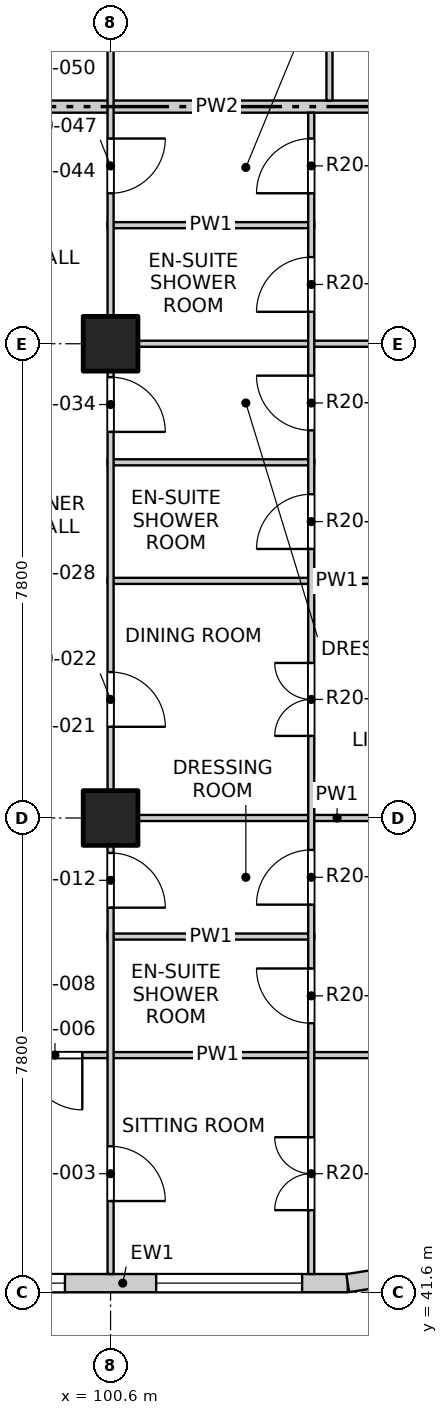
"""IFC4 building model, lengths in metres.
Left out: names, types, materials, properties, quantities, classifications, styles, units other than length and angle.
Written with IfcOpenShell. Run it as: python <this file> out.ifc"""

import sys

from ifc_helpers import new_model, si_unit, direction, frame, frame_2d, origin, origin_2d, place, context, subcontext, project, spatial, rectangle, extrude, element, fill, save


model = new_model("IFC4")
c1 = context("Model", 3, precision=1e-05, world=origin(), true_north=direction((0.0, 1.0)))
c2 = subcontext(c1, "Body", "Model", "MODEL_VIEW")
j1 = project(units=[si_unit("LENGTHUNIT", "METRE"), si_unit("PLANEANGLEUNIT", "RADIAN")], contexts=[c1])
p1 = place(None, origin())
s1 = spatial("IfcSite", under=j1, at=p1, CompositionType="ELEMENT")
p2 = place(p1, origin())
s2 = spatial("IfcBuilding", under=s1, at=p2, CompositionType="ELEMENT")
p3 = place(p2, frame((0.0, 0.0, 204.1)))
s3 = spatial("IfcBuildingStorey", under=s2, at=p3, CompositionType="ELEMENT", Elevation=204.1)
for number, where, z_axis, x_axis in (
    (1, (100.6, 49.4, -0.25), (0.0, 0.0, 1.0), (1.0, 0.0, 0.0)),
    (2, (100.6, 57.2, -0.25), (0.0, 0.0, 1.0), (1.0, 0.0, 0.0)),
):
    element("IfcColumn", number, at=place(p3, frame(where, z_axis=z_axis, x_axis=x_axis)), inside=s3, PredefinedType="COLUMN", context=c2, shape_type="SweptSolid", body=[
        extrude(rectangle(XDim=0.9, YDim=0.9, at=origin_2d()), origin(), (0.0, 0.0, 1.0), 3.4),
    ])
p4 = place(p3, frame((97.1, 41.75, 0.0), z_axis=(0.0, 0.0, 1.0), x_axis=(1.0, 0.0, 0.0)))
e3 = element("IfcWall", 3, at=p4, inside=s3, PredefinedType="SOLIDWALL", context=c2, shape_type="SweptSolid", body=[
    extrude(rectangle(XDim=7.4, YDim=0.3, at=frame_2d((3.7, 0.0))), origin(), (0.0, 0.0, 1.0), 2.7),
])
p5 = place(p4, frame((0.35, 0.0, 0.9)))
e4 = element("IfcOpeningElement", 4, at=p5, cuts=e3, PredefinedType="OPENING", context=c2, shape_type="SweptSolid", body=[
    extrude(rectangle(XDim=2.4, YDim=1.8, at=frame_2d((1.2, 0.9))), frame((0.0, 0.16, 0.0), z_axis=(0.0, -1.0, 0.0), x_axis=(1.0, 0.0, 0.0)), (0.0, 0.0, 1.0), 0.32),
])
p6 = place(p4, frame((4.25, 0.0, 0.9)))
e5 = element("IfcOpeningElement", 5, at=p6, cuts=e3, PredefinedType="OPENING", context=c2, shape_type="SweptSolid", body=[
    extrude(rectangle(XDim=2.4, YDim=1.8, at=frame_2d((1.2, 0.9))), frame((0.0, 0.16, 0.0), z_axis=(0.0, -1.0, 0.0), x_axis=(1.0, 0.0, 0.0)), (0.0, 0.0, 1.0), 0.32),
])
p7 = place(p3, frame((104.5, 41.75, 0.0), z_axis=(0.0, 0.0, 1.0), x_axis=(0.987678452879, 0.156496880861, 0.0)))
e6 = element("IfcWall", 6, at=p7, inside=s3, PredefinedType="SOLIDWALL", context=c2, shape_type="SweptSolid", body=[
    extrude(rectangle(XDim=1.173, YDim=0.3, at=frame_2d((0.586, 0.0))), origin(), (0.0, 0.0, 1.0), 2.7),
])
p8 = place(p3, frame((96.625, 45.5, 0.0), z_axis=(0.0, 0.0, 1.0), x_axis=(1.0, 0.0, 0.0)))
e7 = element("IfcWall", 7, at=p8, inside=s3, PredefinedType="PARTITIONING", context=c2, shape_type="SweptSolid", body=[
    extrude(rectangle(XDim=11.475, YDim=0.1, at=frame_2d((5.738, 0.0))), origin(), (0.0, 0.0, 1.0), 3.15),
])
p9 = place(p8, frame((2.61, 0.0, 0.0)))
e8 = element("IfcOpeningElement", 8, at=p9, cuts=e7, PredefinedType="OPENING", context=c2, shape_type="SweptSolid", body=[
    extrude(rectangle(XDim=0.9, YDim=2.1, at=frame_2d((0.45, 1.05))), frame((0.0, 0.06, 0.0), z_axis=(0.0, -1.0, 0.0), x_axis=(1.0, 0.0, 0.0)), (0.0, 0.0, 1.0), 0.12),
])
p10 = place(p3, frame((100.55, 47.45, 0.0), z_axis=(0.0, 0.0, 1.0), x_axis=(1.0, 0.0, 0.0)))
e9 = element("IfcWall", 9, at=p10, inside=s3, PredefinedType="PARTITIONING", context=c2, shape_type="SweptSolid", body=[
    extrude(rectangle(XDim=3.4, YDim=0.1, at=frame_2d((1.7, 0.0))), origin(), (0.0, 0.0, 1.0), 3.15),
])
for number, where, z_axis, x_axis in (
    (10, (100.55, 49.4, 0.0), (0.0, 0.0, 1.0), (1.0, 0.0, 0.0)),
    (11, (100.55, 53.3, 0.0), (0.0, 0.0, 1.0), (1.0, 0.0, 0.0)),
):
    element("IfcWall", number, at=place(p3, frame(where, z_axis=z_axis, x_axis=x_axis)), inside=s3, PredefinedType="PARTITIONING", context=c2, shape_type="SweptSolid", body=[
        extrude(rectangle(XDim=7.55, YDim=0.1, at=frame_2d((3.775, 0.0))), origin(), (0.0, 0.0, 1.0), 3.15),
    ])
p11 = place(p3, frame((100.55, 55.25, 0.0), z_axis=(0.0, 0.0, 1.0), x_axis=(1.0, 0.0, 0.0)))
e12 = element("IfcWall", 12, at=p11, inside=s3, PredefinedType="PARTITIONING", context=c2, shape_type="SweptSolid", body=[
    extrude(rectangle(XDim=3.4, YDim=0.1, at=frame_2d((1.7, 0.0))), origin(), (0.0, 0.0, 1.0), 3.15),
])
p12 = place(p3, frame((100.55, 57.2, 0.0), z_axis=(0.0, 0.0, 1.0), x_axis=(1.0, 0.0, 0.0)))
e13 = element("IfcWall", 13, at=p12, inside=s3, PredefinedType="PARTITIONING", context=c2, shape_type="SweptSolid", body=[
    extrude(rectangle(XDim=7.55, YDim=0.1, at=frame_2d((3.775, 0.0))), origin(), (0.0, 0.0, 1.0), 3.15),
])
p13 = place(p3, frame((100.55, 59.15, 0.0), z_axis=(0.0, 0.0, 1.0), x_axis=(1.0, 0.0, 0.0)))
e14 = element("IfcWall", 14, at=p13, inside=s3, PredefinedType="PARTITIONING", context=c2, shape_type="SweptSolid", body=[
    extrude(rectangle(XDim=3.4, YDim=0.1, at=frame_2d((1.7, 0.0))), origin(), (0.0, 0.0, 1.0), 3.15),
])
p14 = place(p3, frame((96.6, 61.1, 0.0), z_axis=(0.0, 0.0, 1.0), x_axis=(1.0, 0.0, 0.0)))
e15 = element("IfcWall", 15, at=p14, inside=s3, PredefinedType="PARTITIONING", context=c2, shape_type="SweptSolid", body=[
    extrude(rectangle(XDim=11.5, YDim=0.2, at=frame_2d((5.75, 0.0))), origin(), (0.0, 0.0, 1.0), 2.55),
])
p15 = place(p3, frame((100.6, 41.9, 0.0), z_axis=(0.0, 0.0, 1.0), x_axis=(0.0, 1.0, 0.0)))
e16 = element("IfcWall", 16, at=p15, inside=s3, PredefinedType="PARTITIONING", context=c2, shape_type="SweptSolid", body=[
    extrude(rectangle(XDim=46.2, YDim=0.1, at=frame_2d((23.1, 0.0))), origin(), (0.0, 0.0, 1.0), 3.15),
])
p16 = place(p15, frame((1.2, 0.0, 0.0)))
e17 = element("IfcOpeningElement", 17, at=p16, cuts=e16, PredefinedType="OPENING", context=c2, shape_type="SweptSolid", body=[
    extrude(rectangle(XDim=0.9, YDim=2.1, at=frame_2d((0.45, 1.05))), frame((0.0, 0.06, 0.0), z_axis=(0.0, -1.0, 0.0), x_axis=(1.0, 0.0, 0.0)), (0.0, 0.0, 1.0), 0.12),
])
p17 = place(p15, frame((6.025, 0.0, 0.0)))
e18 = element("IfcOpeningElement", 18, at=p17, cuts=e16, PredefinedType="OPENING", context=c2, shape_type="SweptSolid", body=[
    extrude(rectangle(XDim=0.9, YDim=2.1, at=frame_2d((0.45, 1.05))), frame((0.0, 0.06, 0.0), z_axis=(0.0, -1.0, 0.0), x_axis=(1.0, 0.0, 0.0)), (0.0, 0.0, 1.0), 0.12),
])
p18 = place(p15, frame((9.0, 0.0, 0.0)))
e19 = element("IfcOpeningElement", 19, at=p18, cuts=e16, PredefinedType="OPENING", context=c2, shape_type="SweptSolid", body=[
    extrude(rectangle(XDim=0.9, YDim=2.1, at=frame_2d((0.45, 1.05))), frame((0.0, 0.06, 0.0), z_axis=(0.0, -1.0, 0.0), x_axis=(1.0, 0.0, 0.0)), (0.0, 0.0, 1.0), 0.12),
])
p19 = place(p15, frame((13.85, 0.0, 0.0)))
e20 = element("IfcOpeningElement", 20, at=p19, cuts=e16, PredefinedType="OPENING", context=c2, shape_type="SweptSolid", body=[
    extrude(rectangle(XDim=0.9, YDim=2.1, at=frame_2d((0.45, 1.05))), frame((0.0, 0.06, 0.0), z_axis=(0.0, -1.0, 0.0), x_axis=(1.0, 0.0, 0.0)), (0.0, 0.0, 1.0), 0.12),
])
p20 = place(p15, frame((17.775, 0.0, 0.0)))
e21 = element("IfcOpeningElement", 21, at=p20, cuts=e16, PredefinedType="OPENING", context=c2, shape_type="SweptSolid", body=[
    extrude(rectangle(XDim=0.9, YDim=2.1, at=frame_2d((0.45, 1.05))), frame((0.0, 0.06, 0.0), z_axis=(0.0, -1.0, 0.0), x_axis=(1.0, 0.0, 0.0)), (0.0, 0.0, 1.0), 0.12),
])
p21 = place(p15, frame((20.7, 0.0, 0.0)))
e22 = element("IfcOpeningElement", 22, at=p21, cuts=e16, PredefinedType="OPENING", context=c2, shape_type="SweptSolid", body=[
    extrude(rectangle(XDim=0.9, YDim=2.1, at=frame_2d((0.45, 1.05))), frame((0.0, 0.06, 0.0), z_axis=(0.0, -1.0, 0.0), x_axis=(1.0, 0.0, 0.0)), (0.0, 0.0, 1.0), 0.12),
])
p22 = place(p15, frame((24.6, 0.0, 0.0)))
e23 = element("IfcOpeningElement", 23, at=p22, cuts=e16, PredefinedType="OPENING", context=c2, shape_type="SweptSolid", body=[
    extrude(rectangle(XDim=0.9, YDim=2.1, at=frame_2d((0.45, 1.05))), frame((0.0, 0.06, 0.0), z_axis=(0.0, -1.0, 0.0), x_axis=(1.0, 0.0, 0.0)), (0.0, 0.0, 1.0), 0.12),
])
p23 = place(p15, frame((29.425, 0.0, 0.0)))
e24 = element("IfcOpeningElement", 24, at=p23, cuts=e16, PredefinedType="OPENING", context=c2, shape_type="SweptSolid", body=[
    extrude(rectangle(XDim=0.9, YDim=2.1, at=frame_2d((0.45, 1.05))), frame((0.0, 0.06, 0.0), z_axis=(0.0, -1.0, 0.0), x_axis=(1.0, 0.0, 0.0)), (0.0, 0.0, 1.0), 0.12),
])
p24 = place(p15, frame((33.375, 0.0, 0.0)))
e25 = element("IfcOpeningElement", 25, at=p24, cuts=e16, PredefinedType="OPENING", context=c2, shape_type="SweptSolid", body=[
    extrude(rectangle(XDim=0.9, YDim=2.1, at=frame_2d((0.45, 1.05))), frame((0.0, 0.06, 0.0), z_axis=(0.0, -1.0, 0.0), x_axis=(1.0, 0.0, 0.0)), (0.0, 0.0, 1.0), 0.12),
])
p25 = place(p15, frame((36.3, 0.0, 0.0)))
e26 = element("IfcOpeningElement", 26, at=p25, cuts=e16, PredefinedType="OPENING", context=c2, shape_type="SweptSolid", body=[
    extrude(rectangle(XDim=0.9, YDim=2.1, at=frame_2d((0.45, 1.05))), frame((0.0, 0.06, 0.0), z_axis=(0.0, -1.0, 0.0), x_axis=(1.0, 0.0, 0.0)), (0.0, 0.0, 1.0), 0.12),
])
p26 = place(p15, frame((41.175, 0.0, 0.0)))
e27 = element("IfcOpeningElement", 27, at=p26, cuts=e16, PredefinedType="OPENING", context=c2, shape_type="SweptSolid", body=[
    extrude(rectangle(XDim=0.9, YDim=2.1, at=frame_2d((0.45, 1.05))), frame((0.0, 0.06, 0.0), z_axis=(0.0, -1.0, 0.0), x_axis=(1.0, 0.0, 0.0)), (0.0, 0.0, 1.0), 0.12),
])
p27 = place(p15, frame((44.1, 0.0, 0.0)))
e28 = element("IfcOpeningElement", 28, at=p27, cuts=e16, PredefinedType="OPENING", context=c2, shape_type="SweptSolid", body=[
    extrude(rectangle(XDim=0.9, YDim=2.1, at=frame_2d((0.45, 1.05))), frame((0.0, 0.06, 0.0), z_axis=(0.0, -1.0, 0.0), x_axis=(1.0, 0.0, 0.0)), (0.0, 0.0, 1.0), 0.12),
])
p28 = place(p3, frame((103.9, 41.9, 0.0), z_axis=(0.0, 0.0, 1.0), x_axis=(0.0, 1.0, 0.0)))
e29 = element("IfcWall", 29, at=p28, inside=s3, PredefinedType="PARTITIONING", context=c2, shape_type="SweptSolid", body=[
    extrude(rectangle(XDim=19.1, YDim=0.1, at=frame_2d((9.55, 0.0))), origin(), (0.0, 0.0, 1.0), 3.15),
])
p29 = place(p28, frame((1.05, 0.0, 0.0)))
e30 = element("IfcOpeningElement", 30, at=p29, cuts=e29, PredefinedType="OPENING", context=c2, shape_type="SweptSolid", body=[
    extrude(rectangle(XDim=1.2, YDim=2.1, at=frame_2d((0.6, 1.05))), frame((0.0, 0.06, 0.0), z_axis=(0.0, -1.0, 0.0), x_axis=(1.0, 0.0, 0.0)), (0.0, 0.0, 1.0), 0.12),
])
p30 = place(p28, frame((4.125, 0.0, 0.0)))
e31 = element("IfcOpeningElement", 31, at=p30, cuts=e29, PredefinedType="OPENING", context=c2, shape_type="SweptSolid", body=[
    extrude(rectangle(XDim=0.9, YDim=2.1, at=frame_2d((0.45, 1.05))), frame((0.0, 0.06, 0.0), z_axis=(0.0, -1.0, 0.0), x_axis=(1.0, 0.0, 0.0)), (0.0, 0.0, 1.0), 0.12),
])
p31 = place(p28, frame((6.075, 0.0, 0.0)))
e32 = element("IfcOpeningElement", 32, at=p31, cuts=e29, PredefinedType="OPENING", context=c2, shape_type="SweptSolid", body=[
    extrude(rectangle(XDim=0.9, YDim=2.1, at=frame_2d((0.45, 1.05))), frame((0.0, 0.06, 0.0), z_axis=(0.0, -1.0, 0.0), x_axis=(1.0, 0.0, 0.0)), (0.0, 0.0, 1.0), 0.12),
])
p32 = place(p28, frame((8.85, 0.0, 0.0)))
e33 = element("IfcOpeningElement", 33, at=p32, cuts=e29, PredefinedType="OPENING", context=c2, shape_type="SweptSolid", body=[
    extrude(rectangle(XDim=1.2, YDim=2.1, at=frame_2d((0.6, 1.05))), frame((0.0, 0.06, 0.0), z_axis=(0.0, -1.0, 0.0), x_axis=(1.0, 0.0, 0.0)), (0.0, 0.0, 1.0), 0.12),
])
p33 = place(p28, frame((11.925, 0.0, 0.0)))
e34 = element("IfcOpeningElement", 34, at=p33, cuts=e29, PredefinedType="OPENING", context=c2, shape_type="SweptSolid", body=[
    extrude(rectangle(XDim=0.9, YDim=2.1, at=frame_2d((0.45, 1.05))), frame((0.0, 0.06, 0.0), z_axis=(0.0, -1.0, 0.0), x_axis=(1.0, 0.0, 0.0)), (0.0, 0.0, 1.0), 0.12),
])
p34 = place(p28, frame((13.875, 0.0, 0.0)))
e35 = element("IfcOpeningElement", 35, at=p34, cuts=e29, PredefinedType="OPENING", context=c2, shape_type="SweptSolid", body=[
    extrude(rectangle(XDim=0.9, YDim=2.1, at=frame_2d((0.45, 1.05))), frame((0.0, 0.06, 0.0), z_axis=(0.0, -1.0, 0.0), x_axis=(1.0, 0.0, 0.0)), (0.0, 0.0, 1.0), 0.12),
])
p35 = place(p28, frame((15.825, 0.0, 0.0)))
e36 = element("IfcOpeningElement", 36, at=p35, cuts=e29, PredefinedType="OPENING", context=c2, shape_type="SweptSolid", body=[
    extrude(rectangle(XDim=0.9, YDim=2.1, at=frame_2d((0.45, 1.05))), frame((0.0, 0.06, 0.0), z_axis=(0.0, -1.0, 0.0), x_axis=(1.0, 0.0, 0.0)), (0.0, 0.0, 1.0), 0.12),
])
p36 = place(p28, frame((17.775, 0.0, 0.0)))
e37 = element("IfcOpeningElement", 37, at=p36, cuts=e29, PredefinedType="OPENING", context=c2, shape_type="SweptSolid", body=[
    extrude(rectangle(XDim=0.9, YDim=2.1, at=frame_2d((0.45, 1.05))), frame((0.0, 0.06, 0.0), z_axis=(0.0, -1.0, 0.0), x_axis=(1.0, 0.0, 0.0)), (0.0, 0.0, 1.0), 0.12),
])
p37 = place(p3, frame((104.2, 61.2, 0.0), z_axis=(0.0, 0.0, 1.0), x_axis=(0.0, 1.0, 0.0)))
e38 = element("IfcWall", 38, at=p37, inside=s3, PredefinedType="PARTITIONING", context=c2, shape_type="SweptSolid", body=[
    extrude(rectangle(XDim=26.9, YDim=0.1, at=frame_2d((13.45, 0.0))), origin(), (0.0, 0.0, 1.0), 3.15),
])
p38 = place(p37, frame((1.25, 0.0, 0.0)))
e39 = element("IfcOpeningElement", 39, at=p38, cuts=e38, PredefinedType="OPENING", context=c2, shape_type="SweptSolid", body=[
    extrude(rectangle(XDim=1.2, YDim=2.1, at=frame_2d((0.6, 1.05))), frame((0.0, 0.06, 0.0), z_axis=(0.0, -1.0, 0.0), x_axis=(1.0, 0.0, 0.0)), (0.0, 0.0, 1.0), 0.12),
])
p39 = place(p37, frame((5.15, 0.0, 0.0)))
e40 = element("IfcOpeningElement", 40, at=p39, cuts=e38, PredefinedType="OPENING", context=c2, shape_type="SweptSolid", body=[
    extrude(rectangle(XDim=1.2, YDim=2.1, at=frame_2d((0.6, 1.05))), frame((0.0, 0.06, 0.0), z_axis=(0.0, -1.0, 0.0), x_axis=(1.0, 0.0, 0.0)), (0.0, 0.0, 1.0), 0.12),
])
p40 = place(p37, frame((8.225, 0.0, 0.0)))
e41 = element("IfcOpeningElement", 41, at=p40, cuts=e38, PredefinedType="OPENING", context=c2, shape_type="SweptSolid", body=[
    extrude(rectangle(XDim=0.9, YDim=2.1, at=frame_2d((0.45, 1.05))), frame((0.0, 0.06, 0.0), z_axis=(0.0, -1.0, 0.0), x_axis=(1.0, 0.0, 0.0)), (0.0, 0.0, 1.0), 0.12),
])
p41 = place(p37, frame((10.175, 0.0, 0.0)))
e42 = element("IfcOpeningElement", 42, at=p41, cuts=e38, PredefinedType="OPENING", context=c2, shape_type="SweptSolid", body=[
    extrude(rectangle(XDim=0.9, YDim=2.1, at=frame_2d((0.45, 1.05))), frame((0.0, 0.06, 0.0), z_axis=(0.0, -1.0, 0.0), x_axis=(1.0, 0.0, 0.0)), (0.0, 0.0, 1.0), 0.12),
])
p42 = place(p37, frame((12.125, 0.0, 0.0)))
e43 = element("IfcOpeningElement", 43, at=p42, cuts=e38, PredefinedType="OPENING", context=c2, shape_type="SweptSolid", body=[
    extrude(rectangle(XDim=0.9, YDim=2.1, at=frame_2d((0.45, 1.05))), frame((0.0, 0.06, 0.0), z_axis=(0.0, -1.0, 0.0), x_axis=(1.0, 0.0, 0.0)), (0.0, 0.0, 1.0), 0.12),
])
p43 = place(p37, frame((14.075, 0.0, 0.0)))
e44 = element("IfcOpeningElement", 44, at=p43, cuts=e38, PredefinedType="OPENING", context=c2, shape_type="SweptSolid", body=[
    extrude(rectangle(XDim=0.9, YDim=2.1, at=frame_2d((0.45, 1.05))), frame((0.0, 0.06, 0.0), z_axis=(0.0, -1.0, 0.0), x_axis=(1.0, 0.0, 0.0)), (0.0, 0.0, 1.0), 0.12),
])
p44 = place(p37, frame((16.85, 0.0, 0.0)))
e45 = element("IfcOpeningElement", 45, at=p44, cuts=e38, PredefinedType="OPENING", context=c2, shape_type="SweptSolid", body=[
    extrude(rectangle(XDim=1.2, YDim=2.1, at=frame_2d((0.6, 1.05))), frame((0.0, 0.06, 0.0), z_axis=(0.0, -1.0, 0.0), x_axis=(1.0, 0.0, 0.0)), (0.0, 0.0, 1.0), 0.12),
])
p45 = place(p37, frame((19.925, 0.0, 0.0)))
e46 = element("IfcOpeningElement", 46, at=p45, cuts=e38, PredefinedType="OPENING", context=c2, shape_type="SweptSolid", body=[
    extrude(rectangle(XDim=0.9, YDim=2.1, at=frame_2d((0.45, 1.05))), frame((0.0, 0.06, 0.0), z_axis=(0.0, -1.0, 0.0), x_axis=(1.0, 0.0, 0.0)), (0.0, 0.0, 1.0), 0.12),
])
p46 = place(p37, frame((21.875, 0.0, 0.0)))
e47 = element("IfcOpeningElement", 47, at=p46, cuts=e38, PredefinedType="OPENING", context=c2, shape_type="SweptSolid", body=[
    extrude(rectangle(XDim=0.9, YDim=2.1, at=frame_2d((0.45, 1.05))), frame((0.0, 0.06, 0.0), z_axis=(0.0, -1.0, 0.0), x_axis=(1.0, 0.0, 0.0)), (0.0, 0.0, 1.0), 0.12),
])
p47 = place(p37, frame((24.65, 0.0, 0.0)))
e48 = element("IfcOpeningElement", 48, at=p47, cuts=e38, PredefinedType="OPENING", context=c2, shape_type="SweptSolid", body=[
    extrude(rectangle(XDim=1.2, YDim=2.1, at=frame_2d((0.6, 1.05))), frame((0.0, 0.06, 0.0), z_axis=(0.0, -1.0, 0.0), x_axis=(1.0, 0.0, 0.0)), (0.0, 0.0, 1.0), 0.12),
])
p48 = place(p5, origin())
e49 = element("IfcWindow", 49, at=p48, inside=s3, PartitioningType="DOUBLE_PANEL_VERTICAL", PredefinedType="WINDOW", context=c2, shape_type="SweptSolid", body=[
    extrude(rectangle(XDim=2.4, YDim=1.8, at=frame_2d((1.2, 0.9))), frame((0.0, 0.03, 0.0), z_axis=(0.0, -1.0, 0.0), x_axis=(1.0, 0.0, 0.0)), (0.0, 0.0, 1.0), 0.06),
])
fill(e4, e49)
p49 = place(p6, origin())
e50 = element("IfcWindow", 50, at=p49, inside=s3, PartitioningType="DOUBLE_PANEL_VERTICAL", PredefinedType="WINDOW", context=c2, shape_type="SweptSolid", body=[
    extrude(rectangle(XDim=2.4, YDim=1.8, at=frame_2d((1.2, 0.9))), frame((0.0, 0.03, 0.0), z_axis=(0.0, -1.0, 0.0), x_axis=(1.0, 0.0, 0.0)), (0.0, 0.0, 1.0), 0.06),
])
fill(e5, e50)
p50 = place(p16, origin())
e51 = element("IfcDoor", 51, at=p50, inside=s3, OperationType="SINGLE_SWING_RIGHT", PredefinedType="DOOR", context=c2, shape_type="SweptSolid", body=[
    extrude(rectangle(XDim=0.9, YDim=2.1, at=frame_2d((0.45, 1.05))), frame((0.0, 0.025, 0.0), z_axis=(0.0, -1.0, 0.0), x_axis=(1.0, 0.0, 0.0)), (0.0, 0.0, 1.0), 0.05),
])
fill(e17, e51)
p51 = place(p29, origin())
e52 = element("IfcDoor", 52, at=p51, inside=s3, OperationType="DOUBLE_DOOR_SINGLE_SWING", PredefinedType="DOOR", context=c2, shape_type="SweptSolid", body=[
    extrude(rectangle(XDim=1.2, YDim=2.1, at=frame_2d((0.6, 1.05))), frame((0.0, 0.025, 0.0), z_axis=(0.0, -1.0, 0.0), x_axis=(1.0, 0.0, 0.0)), (0.0, 0.0, 1.0), 0.05),
])
fill(e30, e52)
p52 = place(p9, origin())
e53 = element("IfcDoor", 53, at=p52, inside=s3, OperationType="SINGLE_SWING_LEFT", PredefinedType="DOOR", context=c2, shape_type="SweptSolid", body=[
    extrude(rectangle(XDim=0.9, YDim=2.1, at=frame_2d((0.45, 1.05))), frame((0.0, 0.025, 0.0), z_axis=(0.0, -1.0, 0.0), x_axis=(1.0, 0.0, 0.0)), (0.0, 0.0, 1.0), 0.05),
])
fill(e8, e53)
p53 = place(p30, origin())
e54 = element("IfcDoor", 54, at=p53, inside=s3, OperationType="SINGLE_SWING_RIGHT", PredefinedType="DOOR", context=c2, shape_type="SweptSolid", body=[
    extrude(rectangle(XDim=0.9, YDim=2.1, at=frame_2d((0.45, 1.05))), frame((0.0, 0.025, 0.0), z_axis=(0.0, -1.0, 0.0), x_axis=(1.0, 0.0, 0.0)), (0.0, 0.0, 1.0), 0.05),
])
fill(e31, e54)
p54 = place(p17, origin())
e55 = element("IfcDoor", 55, at=p54, inside=s3, OperationType="SINGLE_SWING_RIGHT", PredefinedType="DOOR", context=c2, shape_type="SweptSolid", body=[
    extrude(rectangle(XDim=0.9, YDim=2.1, at=frame_2d((0.45, 1.05))), frame((0.0, 0.025, 0.0), z_axis=(0.0, -1.0, 0.0), x_axis=(1.0, 0.0, 0.0)), (0.0, 0.0, 1.0), 0.05),
])
fill(e18, e55)
p55 = place(p31, origin())
e56 = element("IfcDoor", 56, at=p55, inside=s3, OperationType="SINGLE_SWING_LEFT", PredefinedType="DOOR", context=c2, shape_type="SweptSolid", body=[
    extrude(rectangle(XDim=0.9, YDim=2.1, at=frame_2d((0.45, 1.05))), frame((0.0, 0.025, 0.0), z_axis=(0.0, -1.0, 0.0), x_axis=(1.0, 0.0, 0.0)), (0.0, 0.0, 1.0), 0.05),
])
fill(e32, e56)
p56 = place(p18, origin())
e57 = element("IfcDoor", 57, at=p56, inside=s3, OperationType="SINGLE_SWING_RIGHT", PredefinedType="DOOR", context=c2, shape_type="SweptSolid", body=[
    extrude(rectangle(XDim=0.9, YDim=2.1, at=frame_2d((0.45, 1.05))), frame((0.0, 0.025, 0.0), z_axis=(0.0, -1.0, 0.0), x_axis=(1.0, 0.0, 0.0)), (0.0, 0.0, 1.0), 0.05),
])
fill(e19, e57)
p57 = place(p32, origin())
e58 = element("IfcDoor", 58, at=p57, inside=s3, OperationType="DOUBLE_DOOR_SINGLE_SWING", PredefinedType="DOOR", context=c2, shape_type="SweptSolid", body=[
    extrude(rectangle(XDim=1.2, YDim=2.1, at=frame_2d((0.6, 1.05))), frame((0.0, 0.025, 0.0), z_axis=(0.0, -1.0, 0.0), x_axis=(1.0, 0.0, 0.0)), (0.0, 0.0, 1.0), 0.05),
])
fill(e33, e58)
p58 = place(p33, origin())
e59 = element("IfcDoor", 59, at=p58, inside=s3, OperationType="SINGLE_SWING_LEFT", PredefinedType="DOOR", context=c2, shape_type="SweptSolid", body=[
    extrude(rectangle(XDim=0.9, YDim=2.1, at=frame_2d((0.45, 1.05))), frame((0.0, 0.025, 0.0), z_axis=(0.0, -1.0, 0.0), x_axis=(1.0, 0.0, 0.0)), (0.0, 0.0, 1.0), 0.05),
])
fill(e34, e59)
p59 = place(p19, origin())
e60 = element("IfcDoor", 60, at=p59, inside=s3, OperationType="SINGLE_SWING_RIGHT", PredefinedType="DOOR", context=c2, shape_type="SweptSolid", body=[
    extrude(rectangle(XDim=0.9, YDim=2.1, at=frame_2d((0.45, 1.05))), frame((0.0, 0.025, 0.0), z_axis=(0.0, -1.0, 0.0), x_axis=(1.0, 0.0, 0.0)), (0.0, 0.0, 1.0), 0.05),
])
fill(e20, e60)
p60 = place(p34, origin())
e61 = element("IfcDoor", 61, at=p60, inside=s3, OperationType="SINGLE_SWING_RIGHT", PredefinedType="DOOR", context=c2, shape_type="SweptSolid", body=[
    extrude(rectangle(XDim=0.9, YDim=2.1, at=frame_2d((0.45, 1.05))), frame((0.0, 0.025, 0.0), z_axis=(0.0, -1.0, 0.0), x_axis=(1.0, 0.0, 0.0)), (0.0, 0.0, 1.0), 0.05),
])
fill(e35, e61)
p61 = place(p35, origin())
e62 = element("IfcDoor", 62, at=p61, inside=s3, OperationType="SINGLE_SWING_LEFT", PredefinedType="DOOR", context=c2, shape_type="SweptSolid", body=[
    extrude(rectangle(XDim=0.9, YDim=2.1, at=frame_2d((0.45, 1.05))), frame((0.0, 0.025, 0.0), z_axis=(0.0, -1.0, 0.0), x_axis=(1.0, 0.0, 0.0)), (0.0, 0.0, 1.0), 0.05),
])
fill(e36, e62)
p62 = place(p20, origin())
e63 = element("IfcDoor", 63, at=p62, inside=s3, OperationType="SINGLE_SWING_LEFT", PredefinedType="DOOR", context=c2, shape_type="SweptSolid", body=[
    extrude(rectangle(XDim=0.9, YDim=2.1, at=frame_2d((0.45, 1.05))), frame((0.0, 0.025, 0.0), z_axis=(0.0, -1.0, 0.0), x_axis=(1.0, 0.0, 0.0)), (0.0, 0.0, 1.0), 0.05),
])
fill(e21, e63)
p63 = place(p36, origin())
e64 = element("IfcDoor", 64, at=p63, inside=s3, OperationType="SINGLE_SWING_LEFT", PredefinedType="DOOR", context=c2, shape_type="SweptSolid", body=[
    extrude(rectangle(XDim=0.9, YDim=2.1, at=frame_2d((0.45, 1.05))), frame((0.0, 0.025, 0.0), z_axis=(0.0, -1.0, 0.0), x_axis=(1.0, 0.0, 0.0)), (0.0, 0.0, 1.0), 0.05),
])
fill(e37, e64)
save(model, sys.argv[1])
